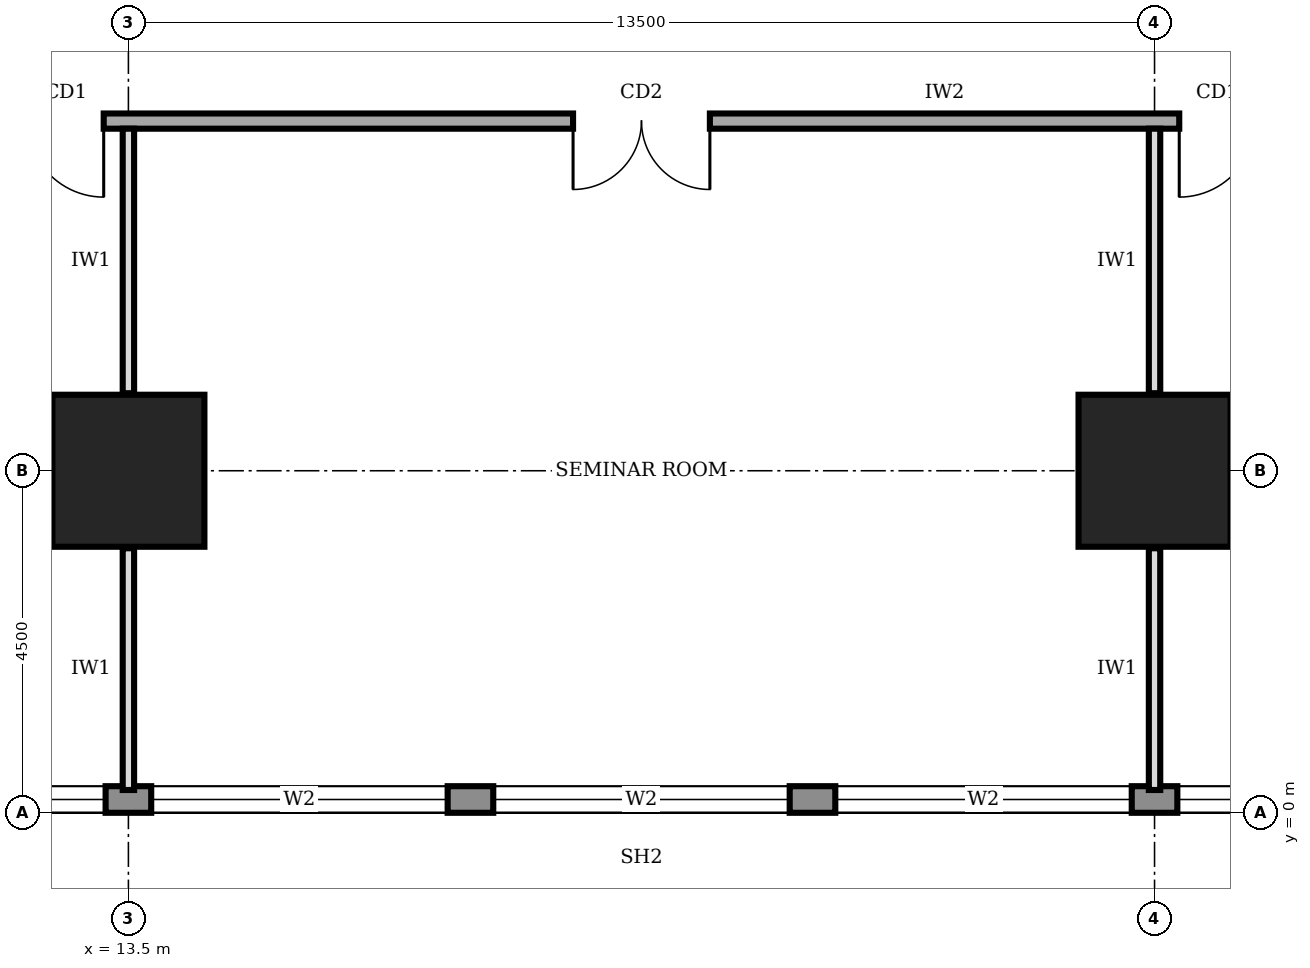
"""IFC4 building model, lengths in metres.
Left out: names, types, materials, properties, quantities, classifications, styles, units other than length and angle.
Written with IfcOpenShell. Run it as: python <this file> out.ifc"""

import sys

from ifc_helpers import new_model, si_unit, direction, frame, frame_2d, origin, origin_2d, place, context, subcontext, project, spatial, rectangle, extrude, element, fill, save


model = new_model("IFC4")
c1 = context("Model", 3, precision=1e-05, world=origin(), true_north=direction((0.0, 1.0)))
c2 = subcontext(c1, "Body", "Model", "MODEL_VIEW")
j1 = project(units=[si_unit("LENGTHUNIT", "METRE"), si_unit("PLANEANGLEUNIT", "RADIAN")], contexts=[c1])
p1 = place(None, origin())
s1 = spatial("IfcSite", under=j1, at=p1, CompositionType="ELEMENT")
p2 = place(p1, origin())
s2 = spatial("IfcBuilding", under=s1, at=p2, CompositionType="ELEMENT")
p3 = place(p2, frame((0.0, 0.0, 57.0)))
s3 = spatial("IfcBuildingStorey", under=s2, at=p3, CompositionType="ELEMENT", Elevation=57.0)
for number, where, z_axis, x_axis in (
    (1, (13.5, 4.5, 0.0), (0.0, 0.0, 1.0), (1.0, 0.0, 0.0)),
    (2, (27.0, 4.5, 0.0), (0.0, 0.0, 1.0), (1.0, 0.0, 0.0)),
):
    element("IfcColumn", number, at=place(p3, frame(where, z_axis=z_axis, x_axis=x_axis)), inside=s3, PredefinedType="COLUMN", context=c2, shape_type="SweptSolid", body=[
        extrude(rectangle(XDim=2.0, YDim=2.0, at=origin_2d()), origin(), (0.0, 0.0, 1.0), 4.0),
    ])
p4 = place(p3, frame((4.52, 0.175, 0.0), z_axis=(0.0, 0.0, 1.0), x_axis=(1.0, 0.0, 0.0)))
e3 = element("IfcWall", 3, at=p4, inside=s3, PredefinedType="STANDARD", context=c2, shape_type="SweptSolid", body=[
    extrude(rectangle(XDim=31.46, YDim=0.35, at=frame_2d((15.73, 0.0))), origin(), (0.0, 0.0, 1.0), 3.75),
])
p5 = place(p4, frame((4.78, 0.0, 0.6)))
e4 = element("IfcOpeningElement", 4, at=p5, cuts=e3, PredefinedType="OPENING", context=c2, shape_type="SweptSolid", body=[
    extrude(rectangle(XDim=3.9, YDim=2.6, at=frame_2d((1.95, 1.3))), frame((0.0, 0.185, 0.0), z_axis=(0.0, -1.0, 0.0), x_axis=(1.0, 0.0, 0.0)), (0.0, 0.0, 1.0), 0.37),
])
p6 = place(p4, frame((9.28, 0.0, 0.6)))
e5 = element("IfcOpeningElement", 5, at=p6, cuts=e3, PredefinedType="OPENING", context=c2, shape_type="SweptSolid", body=[
    extrude(rectangle(XDim=3.9, YDim=2.6, at=frame_2d((1.95, 1.3))), frame((0.0, 0.185, 0.0), z_axis=(0.0, -1.0, 0.0), x_axis=(1.0, 0.0, 0.0)), (0.0, 0.0, 1.0), 0.37),
])
p7 = place(p4, frame((13.78, 0.0, 0.6)))
e6 = element("IfcOpeningElement", 6, at=p7, cuts=e3, PredefinedType="OPENING", context=c2, shape_type="SweptSolid", body=[
    extrude(rectangle(XDim=3.9, YDim=2.6, at=frame_2d((1.95, 1.3))), frame((0.0, 0.185, 0.0), z_axis=(0.0, -1.0, 0.0), x_axis=(1.0, 0.0, 0.0)), (0.0, 0.0, 1.0), 0.37),
])
p8 = place(p4, frame((18.28, 0.0, 0.6)))
e7 = element("IfcOpeningElement", 7, at=p8, cuts=e3, PredefinedType="OPENING", context=c2, shape_type="SweptSolid", body=[
    extrude(rectangle(XDim=3.9, YDim=2.6, at=frame_2d((1.95, 1.3))), frame((0.0, 0.185, 0.0), z_axis=(0.0, -1.0, 0.0), x_axis=(1.0, 0.0, 0.0)), (0.0, 0.0, 1.0), 0.37),
])
p9 = place(p4, frame((22.78, 0.0, 0.6)))
e8 = element("IfcOpeningElement", 8, at=p9, cuts=e3, PredefinedType="OPENING", context=c2, shape_type="SweptSolid", body=[
    extrude(rectangle(XDim=3.9, YDim=2.6, at=frame_2d((1.95, 1.3))), frame((0.0, 0.185, 0.0), z_axis=(0.0, -1.0, 0.0), x_axis=(1.0, 0.0, 0.0)), (0.0, 0.0, 1.0), 0.37),
])
p10 = place(p4, frame((27.21, 0.0, 0.6)))
e9 = element("IfcOpeningElement", 9, at=p10, cuts=e3, PredefinedType="OPENING", context=c2, shape_type="SweptSolid", body=[
    extrude(rectangle(XDim=3.9, YDim=2.6, at=frame_2d((1.95, 1.3))), frame((0.0, 0.185, 0.0), z_axis=(0.0, -1.0, 0.0), x_axis=(1.0, 0.0, 0.0)), (0.0, 0.0, 1.0), 0.37),
])
p11 = place(p3, frame((11.9, 9.1, 0.0), z_axis=(0.0, 0.0, 1.0), x_axis=(1.0, 0.0, 0.0)))
e10 = element("IfcWall", 10, at=p11, inside=s3, PredefinedType="SOLIDWALL", context=c2, shape_type="SweptSolid", body=[
    extrude(rectangle(XDim=16.9, YDim=0.2, at=frame_2d((8.45, 0.0))), origin(), (0.0, 0.0, 1.0), 3.75),
])
p12 = place(p11, frame((0.275, 0.0, 0.0)))
e11 = element("IfcOpeningElement", 11, at=p12, cuts=e10, PredefinedType="OPENING", context=c2, shape_type="SweptSolid", body=[
    extrude(rectangle(XDim=1.0, YDim=2.1, at=frame_2d((0.5, 1.05))), frame((0.0, 0.11, 0.0), z_axis=(0.0, -1.0, 0.0), x_axis=(1.0, 0.0, 0.0)), (0.0, 0.0, 1.0), 0.22),
])
p13 = place(p11, frame((7.45, 0.0, 0.0)))
e12 = element("IfcOpeningElement", 12, at=p13, cuts=e10, PredefinedType="OPENING", context=c2, shape_type="SweptSolid", body=[
    extrude(rectangle(XDim=1.8, YDim=2.1, at=frame_2d((0.9, 1.05))), frame((0.0, 0.11, 0.0), z_axis=(0.0, -1.0, 0.0), x_axis=(1.0, 0.0, 0.0)), (0.0, 0.0, 1.0), 0.22),
])
p14 = place(p11, frame((15.425, 0.0, 0.0)))
e13 = element("IfcOpeningElement", 13, at=p14, cuts=e10, PredefinedType="OPENING", context=c2, shape_type="SweptSolid", body=[
    extrude(rectangle(XDim=1.0, YDim=2.1, at=frame_2d((0.5, 1.05))), frame((0.0, 0.11, 0.0), z_axis=(0.0, -1.0, 0.0), x_axis=(1.0, 0.0, 0.0)), (0.0, 0.0, 1.0), 0.22),
])
p15 = place(p3, frame((13.5, 0.3, 0.0), z_axis=(0.0, 0.0, 1.0), x_axis=(0.0, 1.0, 0.0)))
e14 = element("IfcWall", 14, at=p15, inside=s3, PredefinedType="PARTITIONING", context=c2, shape_type="SweptSolid", body=[
    extrude(rectangle(XDim=3.18, YDim=0.15, at=frame_2d((1.59, 0.0))), origin(), (0.0, 0.0, 1.0), 2.85),
])
p16 = place(p3, frame((13.5, 5.52, 0.0), z_axis=(0.0, 0.0, 1.0), x_axis=(0.0, 1.0, 0.0)))
e15 = element("IfcWall", 15, at=p16, inside=s3, PredefinedType="PARTITIONING", context=c2, shape_type="SweptSolid", body=[
    extrude(rectangle(XDim=3.48, YDim=0.15, at=frame_2d((1.74, 0.0))), origin(), (0.0, 0.0, 1.0), 2.85),
])
p17 = place(p3, frame((27.0, 0.3, 0.0), z_axis=(0.0, 0.0, 1.0), x_axis=(0.0, 1.0, 0.0)))
e16 = element("IfcWall", 16, at=p17, inside=s3, PredefinedType="PARTITIONING", context=c2, shape_type="SweptSolid", body=[
    extrude(rectangle(XDim=3.18, YDim=0.15, at=frame_2d((1.59, 0.0))), origin(), (0.0, 0.0, 1.0), 2.85),
])
p18 = place(p3, frame((27.0, 5.52, 0.0), z_axis=(0.0, 0.0, 1.0), x_axis=(0.0, 1.0, 0.0)))
e17 = element("IfcWall", 17, at=p18, inside=s3, PredefinedType="PARTITIONING", context=c2, shape_type="SweptSolid", body=[
    extrude(rectangle(XDim=3.48, YDim=0.15, at=frame_2d((1.74, 0.0))), origin(), (0.0, 0.0, 1.0), 2.85),
])
p19 = place(p5, origin())
e18 = element("IfcWindow", 18, at=p19, inside=s3, PartitioningType="SINGLE_PANEL", PredefinedType="WINDOW", context=c2, shape_type="SweptSolid", body=[
    extrude(rectangle(XDim=3.9, YDim=2.6, at=frame_2d((1.95, 1.3))), frame((0.0, 0.03, 0.0), z_axis=(0.0, -1.0, 0.0), x_axis=(1.0, 0.0, 0.0)), (0.0, 0.0, 1.0), 0.06),
])
fill(e4, e18)
p20 = place(p6, origin())
e19 = element("IfcWindow", 19, at=p20, inside=s3, PartitioningType="SINGLE_PANEL", PredefinedType="WINDOW", context=c2, shape_type="SweptSolid", body=[
    extrude(rectangle(XDim=3.9, YDim=2.6, at=frame_2d((1.95, 1.3))), frame((0.0, 0.03, 0.0), z_axis=(0.0, -1.0, 0.0), x_axis=(1.0, 0.0, 0.0)), (0.0, 0.0, 1.0), 0.06),
])
fill(e5, e19)
p21 = place(p7, origin())
e20 = element("IfcWindow", 20, at=p21, inside=s3, PartitioningType="SINGLE_PANEL", PredefinedType="WINDOW", context=c2, shape_type="SweptSolid", body=[
    extrude(rectangle(XDim=3.9, YDim=2.6, at=frame_2d((1.95, 1.3))), frame((0.0, 0.03, 0.0), z_axis=(0.0, -1.0, 0.0), x_axis=(1.0, 0.0, 0.0)), (0.0, 0.0, 1.0), 0.06),
])
fill(e6, e20)
p22 = place(p8, origin())
e21 = element("IfcWindow", 21, at=p22, inside=s3, PartitioningType="SINGLE_PANEL", PredefinedType="WINDOW", context=c2, shape_type="SweptSolid", body=[
    extrude(rectangle(XDim=3.9, YDim=2.6, at=frame_2d((1.95, 1.3))), frame((0.0, 0.03, 0.0), z_axis=(0.0, -1.0, 0.0), x_axis=(1.0, 0.0, 0.0)), (0.0, 0.0, 1.0), 0.06),
])
fill(e7, e21)
p23 = place(p9, origin())
e22 = element("IfcWindow", 22, at=p23, inside=s3, PartitioningType="SINGLE_PANEL", PredefinedType="WINDOW", context=c2, shape_type="SweptSolid", body=[
    extrude(rectangle(XDim=3.9, YDim=2.6, at=frame_2d((1.95, 1.3))), frame((0.0, 0.03, 0.0), z_axis=(0.0, -1.0, 0.0), x_axis=(1.0, 0.0, 0.0)), (0.0, 0.0, 1.0), 0.06),
])
fill(e8, e22)
p24 = place(p12, frame((1.0, 0.0, 0.0), z_axis=(0.0, 0.0, 1.0), x_axis=(-1.0, 0.0, 0.0)))
e23 = element("IfcDoor", 23, at=p24, inside=s3, OperationType="SINGLE_SWING_LEFT", PredefinedType="DOOR", context=c2, shape_type="SweptSolid", body=[
    extrude(rectangle(XDim=1.0, YDim=2.1, at=frame_2d((0.5, 1.05))), frame((0.0, 0.025, 0.0), z_axis=(0.0, -1.0, 0.0), x_axis=(1.0, 0.0, 0.0)), (0.0, 0.0, 1.0), 0.05),
])
fill(e11, e23)
p25 = place(p13, frame((1.8, 0.0, 0.0), z_axis=(0.0, 0.0, 1.0), x_axis=(-1.0, 0.0, 0.0)))
e24 = element("IfcDoor", 24, at=p25, inside=s3, OperationType="DOUBLE_DOOR_SINGLE_SWING", PredefinedType="DOOR", context=c2, shape_type="SweptSolid", body=[
    extrude(rectangle(XDim=1.8, YDim=2.1, at=frame_2d((0.9, 1.05))), frame((0.0, 0.025, 0.0), z_axis=(0.0, -1.0, 0.0), x_axis=(1.0, 0.0, 0.0)), (0.0, 0.0, 1.0), 0.05),
])
fill(e12, e24)
p26 = place(p14, frame((1.0, 0.0, 0.0), z_axis=(0.0, 0.0, 1.0), x_axis=(-1.0, 0.0, 0.0)))
e25 = element("IfcDoor", 25, at=p26, inside=s3, OperationType="SINGLE_SWING_RIGHT", PredefinedType="DOOR", context=c2, shape_type="SweptSolid", body=[
    extrude(rectangle(XDim=1.0, YDim=2.1, at=frame_2d((0.5, 1.05))), frame((0.0, 0.025, 0.0), z_axis=(0.0, -1.0, 0.0), x_axis=(1.0, 0.0, 0.0)), (0.0, 0.0, 1.0), 0.05),
])
fill(e13, e25)
save(model, sys.argv[1])
